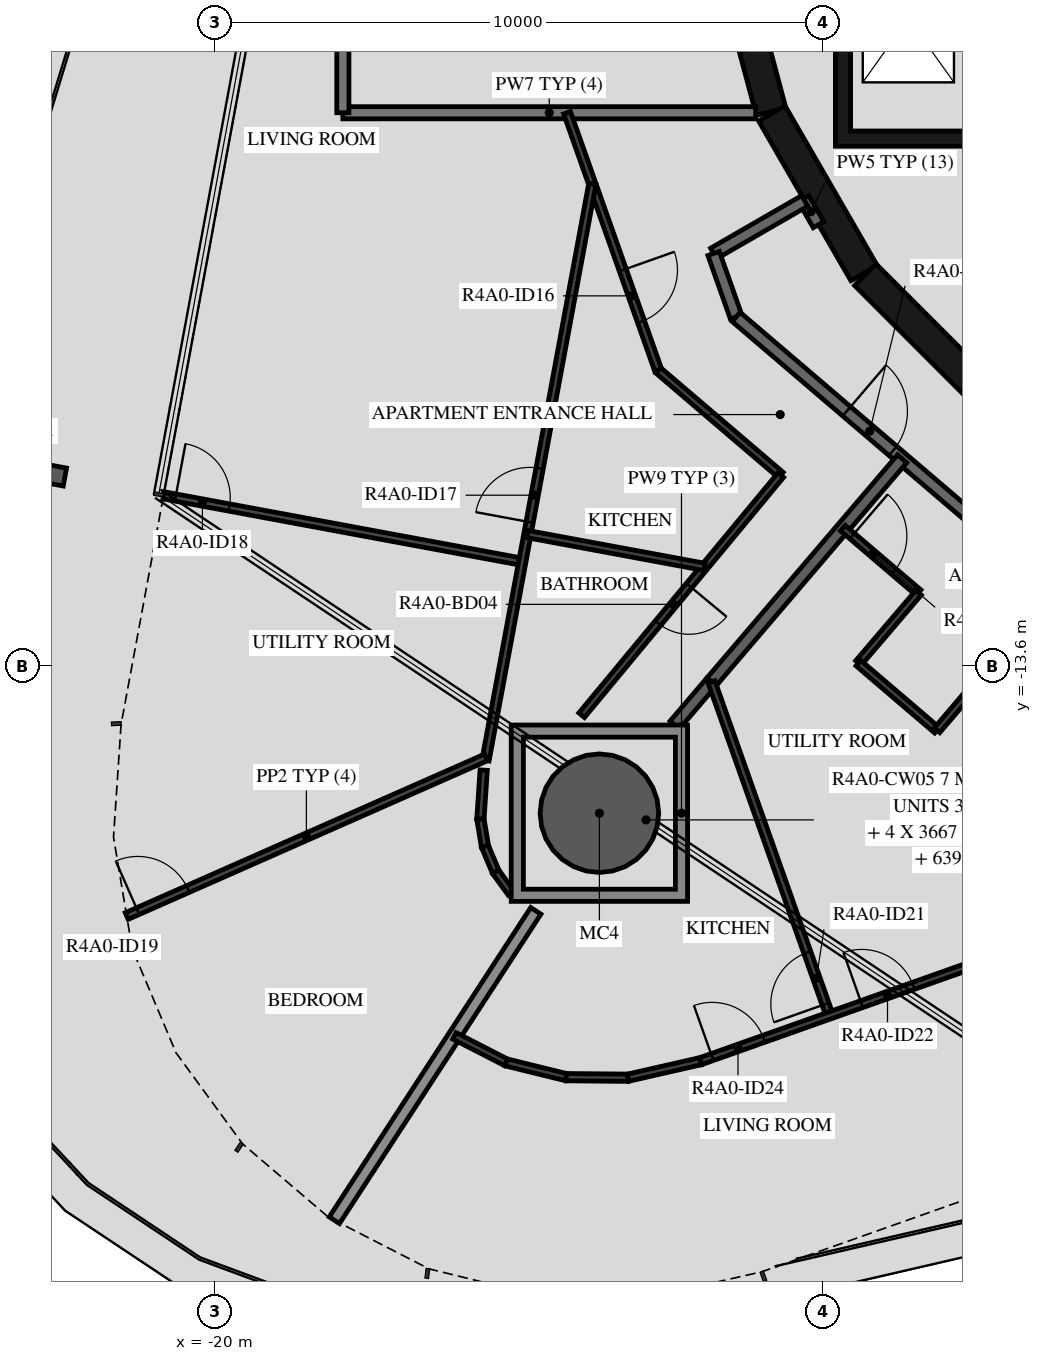
"""IFC4 building model, lengths in metres.
Left out: names, types, materials, properties, quantities, classifications, styles, units other than length and angle.
Written with IfcOpenShell. Run it as: python <this file> out.ifc"""

import sys

from ifc_helpers import new_model, si_unit, direction, frame, frame_2d, origin, origin_2d, place, context, subcontext, project, spatial, polyline, rectangle, hollow_circle, i_section, outline, extrude, element, fill, save


model = new_model("IFC4")
c1 = context("Model", 3, precision=1e-05, world=origin(), true_north=direction((0.0, 1.0)))
c2 = subcontext(c1, "Body", "Model", "MODEL_VIEW")
j1 = project(units=[si_unit("LENGTHUNIT", "METRE"), si_unit("PLANEANGLEUNIT", "RADIAN")], contexts=[c1])
p1 = place(None, origin())
s1 = spatial("IfcSite", under=j1, at=p1, CompositionType="ELEMENT")
p2 = place(p1, origin())
s2 = spatial("IfcBuilding", under=s1, at=p2, CompositionType="ELEMENT")
p3 = place(p2, frame((0.0, 0.0, 151.7)))
s3 = spatial("IfcBuildingStorey", under=s2, at=p3, CompositionType="ELEMENT", Elevation=151.7)
p4 = place(p3, frame((-13.681, -16.019, -0.45), z_axis=(0.0, 0.0, 1.0), x_axis=(1.0, 0.0, 0.0)))
e1 = element("IfcColumn", 1, at=p4, inside=s3, PredefinedType="COLUMN", context=c2, shape_type="SweptSolid", body=[
    extrude(hollow_circle(Radius=0.975, WallThickness=0.045, at=origin_2d()), origin(), (0.0, 0.0, 1.0), 3.57),
])
p5 = place(p3, frame((-22.914, -10.409, -0.45), z_axis=(0.0, 0.0, 1.0), x_axis=(0.182235967681, 0.983254825609, 0.0)))
e2 = element("IfcColumn", 2, at=p5, inside=s3, PredefinedType="COLUMN", context=c2, shape_type="SweptSolid", body=[
    extrude(i_section(OverallWidth=0.3, OverallDepth=0.9, WebThickness=0.019, FlangeThickness=0.035, FilletRadius=0.03, at=origin_2d()), origin(), (0.0, 0.0, 1.0), 3.57),
])
p6 = place(p3, frame((-11.643, -1.55, 0.0), z_axis=(0.0, 0.0, 1.0), x_axis=(0.258734743916, -0.965948410781, 0.0)))
e3 = element("IfcWall", 3, at=p6, inside=s3, PredefinedType="SHEAR", context=c2, shape_type="SweptSolid", body=[
    extrude(rectangle(XDim=3.033, YDim=0.5, at=frame_2d((1.516, 0.0))), origin(), (0.0, 0.0, 1.0), 3.12),
])
p7 = place(p6, frame((1.066, 0.0, 0.0)))
e4 = element("IfcOpeningElement", 4, at=p7, cuts=e3, PredefinedType="OPENING", context=c2, shape_type="SweptSolid", body=[
    extrude(rectangle(XDim=0.9, YDim=2.1, at=frame_2d((0.45, 1.05))), frame((0.0, 0.26, 0.0), z_axis=(0.0, -1.0, 0.0), x_axis=(1.0, 0.0, 0.0)), (0.0, 0.0, 1.0), 0.52),
])
p8 = place(p3, frame((-10.845, -4.51, 0.0), z_axis=(0.0, 0.0, 1.0), x_axis=(0.500087131594, -0.865975092491, 0.0)))
e5 = element("IfcWall", 5, at=p8, inside=s3, PredefinedType="SHEAR", context=c2, shape_type="SweptSolid", body=[
    extrude(rectangle(XDim=3.033, YDim=0.5, at=frame_2d((1.516, 0.0))), origin(), (0.0, 0.0, 1.0), 3.12),
])
p9 = place(p3, frame((-9.308, -7.164, 0.0), z_axis=(0.0, 0.0, 1.0), x_axis=(0.707106781187, -0.707106781187, 0.0)))
e6 = element("IfcWall", 6, at=p9, inside=s3, PredefinedType="SHEAR", context=c2, shape_type="SweptSolid", body=[
    extrude(rectangle(XDim=3.032, YDim=0.5, at=frame_2d((1.516, 0.0))), origin(), (0.0, 0.0, 1.0), 3.12),
])
p10 = place(p3, origin())
e7 = element("IfcWall", 7, at=p10, inside=s3, PredefinedType="SHEAR", context=c2, shape_type="SweptSolid", body=[
    extrude(outline(polyline([(9.8, -5.05), (9.8, -4.8), (9.8, -1.9), (9.55, -1.9), (9.55, -4.8), (7.65, -4.8), (7.65, -1.9), (7.4, -1.9), (7.4, -4.8), (5.5, -4.8), (5.5, -1.9), (5.25, -1.9), (5.25, -4.8), (3.35, -4.8), (3.35, -1.9), (3.1, -1.9), (3.1, -4.8), (1.2, -4.8), (1.2, -1.9), (0.95, -1.9), (0.95, -4.8), (-0.95, -4.8), (-0.95, -1.9), (-1.2, -1.9), (-1.2, -4.8), (-3.1, -4.8), (-3.1, -1.9), (-3.35, -1.9), (-3.35, -4.8), (-5.25, -4.8), (-5.25, -1.9), (-5.5, -1.9), (-5.5, -4.8), (-7.4, -4.8), (-7.4, -1.9), (-7.65, -1.9), (-7.65, -4.8), (-9.55, -4.8), (-9.55, -1.9), (-9.8, -1.9), (-9.8, -4.8), (-9.8, -5.05), (9.8, -5.05)])), origin(), (0.0, 0.0, 1.0), 3.12),
])
p11 = place(p3, frame((-10.323, -5.914, 0.0), z_axis=(0.0, 0.0, 1.0), x_axis=(0.500137201729, -0.865946175837, 0.0)))
e8 = element("IfcWall", 8, at=p11, inside=s3, PredefinedType="STANDARD", context=c2, shape_type="SweptSolid", body=[
    extrude(rectangle(XDim=0.492, YDim=0.2, at=frame_2d((0.246, 0.0))), origin(), (0.0, 0.0, 1.0), 3.12),
])
p12 = place(p3, frame((-10.303, -5.949, 0.0), z_axis=(0.0, 0.0, 1.0), x_axis=(-0.866021168401, -0.500007335828, 0.0)))
e9 = element("IfcWall", 9, at=p12, inside=s3, PredefinedType="STANDARD", context=c2, shape_type="SweptSolid", body=[
    extrude(rectangle(XDim=1.731, YDim=0.2, at=frame_2d((0.865, 0.0))), origin(), (0.0, 0.0, 1.0), 3.12),
])
p13 = place(p3, frame((-11.802, -6.814, 0.0), z_axis=(0.0, 0.0, 1.0), x_axis=(0.333904297771, -0.942606980629, 0.0)))
e10 = element("IfcWall", 10, at=p13, inside=s3, PredefinedType="STANDARD", context=c2, shape_type="SweptSolid", body=[
    extrude(rectangle(XDim=1.107, YDim=0.2, at=frame_2d((0.553, 0.0))), origin(), (0.0, 0.0, 1.0), 3.12),
])
p14 = place(p3, frame((-11.433, -7.858, 0.0), z_axis=(0.0, 0.0, 1.0), x_axis=(0.760412154545, -0.649440801937, 0.0)))
e11 = element("IfcWall", 11, at=p14, inside=s3, PredefinedType="STANDARD", context=c2, shape_type="SweptSolid", body=[
    extrude(rectangle(XDim=7.181, YDim=0.2, at=frame_2d((3.59, 0.0))), origin(), (0.0, 0.0, 1.0), 3.12),
])
p15 = place(p14, frame((2.39, 0.0, 0.0)))
e12 = element("IfcOpeningElement", 12, at=p15, cuts=e11, PredefinedType="OPENING", context=c2, shape_type="SweptSolid", body=[
    extrude(rectangle(XDim=1.0, YDim=2.1, at=frame_2d((0.5, 1.05))), frame((0.0, 0.11, 0.0), z_axis=(0.0, -1.0, 0.0), x_axis=(1.0, 0.0, 0.0)), (0.0, 0.0, 1.0), 0.22),
])
p16 = place(p3, frame((-17.9, -4.5, 0.0), z_axis=(0.0, 0.0, 1.0), x_axis=(1.0, 0.0, 0.0)))
e13 = element("IfcWall", 13, at=p16, inside=s3, PredefinedType="STANDARD", context=c2, shape_type="SweptSolid", body=[
    extrude(rectangle(XDim=6.789, YDim=0.2, at=frame_2d((3.394, 0.0))), origin(), (0.0, 0.0, 1.0), 3.12),
])
p17 = place(p3, frame((-17.9, 4.5, 0.0), z_axis=(0.0, 0.0, 1.0), x_axis=(0.0, -1.0, 0.0)))
e14 = element("IfcWall", 14, at=p17, inside=s3, PredefinedType="STANDARD", context=c2, shape_type="SweptSolid", body=[
    extrude(rectangle(XDim=9.0, YDim=0.2, at=frame_2d((4.5, 0.0))), origin(), (0.0, 0.0, 1.0), 3.12),
])
p18 = place(p3, frame((-11.838, -13.86, 0.0), z_axis=(0.0, 0.0, 1.0), x_axis=(0.64944503311, 0.760408540831, 0.0)))
e15 = element("IfcWall", 15, at=p18, inside=s3, PredefinedType="STANDARD", context=c2, shape_type="SweptSolid", body=[
    extrude(rectangle(XDim=4.827, YDim=0.2, at=frame_2d((2.414, 0.0))), origin(), (0.0, 0.0, 1.0), 3.12),
])
p19 = place(p3, frame((-12.443, -14.569, 0.0), z_axis=(0.0, 0.0, 1.0), x_axis=(0.649517408851, 0.760346720648, 0.0)))
e16 = element("IfcWall", 16, at=p19, inside=s3, PredefinedType="STANDARD", context=c2, shape_type="SweptSolid", body=[
    extrude(rectangle(XDim=0.932, YDim=0.2, at=frame_2d((0.466, 0.0))), origin(), (0.0, 0.0, 1.0), 3.12),
])
p20 = place(p3, frame((-18.04, -22.713, 0.0), z_axis=(0.0, 0.0, 1.0), x_axis=(0.545629831617, 0.83802630439, 0.0)))
e17 = element("IfcWall", 17, at=p20, inside=s3, PredefinedType="STANDARD", context=c2, shape_type="SweptSolid", body=[
    extrude(rectangle(XDim=6.072, YDim=0.2, at=frame_2d((3.036, 0.0))), origin(), (0.0, 0.0, 1.0), 2.73),
])
p21 = place(p3, frame((-14.213, -4.5, 0.0), z_axis=(0.0, 0.0, 1.0), x_axis=(0.333802904542, -0.942642891513, 0.0)))
e18 = element("IfcWall", 18, at=p21, inside=s3, PredefinedType="PARTITIONING", context=c2, shape_type="SweptSolid", body=[
    extrude(rectangle(XDim=4.495, YDim=0.12, at=frame_2d((2.248, 0.0))), origin(), (0.0, 0.0, 1.0), 3.12),
])
p22 = place(p21, frame((2.744, 0.0, 0.0)))
e19 = element("IfcOpeningElement", 19, at=p22, cuts=e18, PredefinedType="OPENING", context=c2, shape_type="SweptSolid", body=[
    extrude(rectangle(XDim=0.9, YDim=2.1, at=frame_2d((0.45, 1.05))), frame((0.0, 0.07, 0.0), z_axis=(0.0, -1.0, 0.0), x_axis=(1.0, 0.0, 0.0)), (0.0, 0.0, 1.0), 0.14),
])
p23 = place(p3, frame((-12.713, -8.737, 0.0), z_axis=(0.0, 0.0, 1.0), x_axis=(0.760400223405, -0.649454771517, 0.0)))
e20 = element("IfcWall", 20, at=p23, inside=s3, PredefinedType="PARTITIONING", context=c2, shape_type="SweptSolid", body=[
    extrude(rectangle(XDim=2.649, YDim=0.12, at=frame_2d((1.325, 0.0))), origin(), (0.0, 0.0, 1.0), 3.12),
])
p24 = place(p3, frame((-10.698, -10.458, 0.0), z_axis=(0.0, 0.0, 1.0), x_axis=(-0.63830561059, -0.769783052223, 0.0)))
e21 = element("IfcWall", 21, at=p24, inside=s3, PredefinedType="PARTITIONING", context=c2, shape_type="SweptSolid", body=[
    extrude(rectangle(XDim=5.131, YDim=0.12, at=frame_2d((2.565, 0.0))), origin(), (0.0, 0.0, 1.0), 3.12),
])
p25 = place(p24, frame((2.363, 0.0, 0.0)))
e22 = element("IfcOpeningElement", 22, at=p25, cuts=e21, PredefinedType="OPENING", context=c2, shape_type="SweptSolid", body=[
    extrude(rectangle(XDim=0.8, YDim=2.1, at=frame_2d((0.4, 1.05))), frame((0.0, 0.07, 0.0), z_axis=(0.0, -1.0, 0.0), x_axis=(1.0, 0.0, 0.0)), (0.0, 0.0, 1.0), 0.14),
])
p26 = place(p3, frame((-20.849, -10.792, 0.0), z_axis=(0.0, 0.0, 1.0), x_axis=(0.983251500113, -0.182253909494, 0.0)))
e23 = element("IfcWall", 23, at=p26, inside=s3, PredefinedType="PARTITIONING", context=c2, shape_type="SweptSolid", body=[
    extrude(rectangle(XDim=6.0, YDim=0.12, at=frame_2d((3.0, 0.0))), origin(), (0.0, 0.0, 1.0), 2.73),
])
p27 = place(p26, frame((0.2, 0.0, 0.0)))
e24 = element("IfcOpeningElement", 24, at=p27, cuts=e23, PredefinedType="OPENING", context=c2, shape_type="SweptSolid", body=[
    extrude(rectangle(XDim=0.9, YDim=2.1, at=frame_2d((0.45, 1.05))), frame((0.0, 0.07, 0.0), z_axis=(0.0, -1.0, 0.0), x_axis=(1.0, 0.0, 0.0)), (0.0, 0.0, 1.0), 0.14),
])
p28 = place(p3, frame((-15.554, -15.149, 0.0), z_axis=(0.0, 0.0, 1.0), x_axis=(0.182237116667, 0.983254612656, 0.0)))
e25 = element("IfcWall", 25, at=p28, inside=s3, PredefinedType="PARTITIONING", context=c2, shape_type="SweptSolid", body=[
    extrude(rectangle(XDim=9.638, YDim=0.12, at=frame_2d((4.819, 0.0))), origin(), (0.0, 0.0, 1.0), 3.12),
])
p29 = place(p28, frame((3.984, 0.0, 0.0)))
e26 = element("IfcOpeningElement", 26, at=p29, cuts=e25, PredefinedType="OPENING", context=c2, shape_type="SweptSolid", body=[
    extrude(rectangle(XDim=0.9, YDim=2.1, at=frame_2d((0.45, 1.05))), frame((0.0, 0.07, 0.0), z_axis=(0.0, -1.0, 0.0), x_axis=(1.0, 0.0, 0.0)), (0.0, 0.0, 1.0), 0.14),
])
p30 = place(p3, frame((-21.455, -17.71, 0.0), z_axis=(0.0, 0.0, 1.0), x_axis=(0.914829518237, 0.403840256243, 0.0)))
e27 = element("IfcWall", 27, at=p30, inside=s3, PredefinedType="PARTITIONING", context=c2, shape_type="SweptSolid", body=[
    extrude(rectangle(XDim=6.459, YDim=0.12, at=frame_2d((3.23, 0.0))), origin(), (0.0, 0.0, 1.0), 2.73),
])
p31 = place(p30, frame((0.2, 0.0, 0.0)))
e28 = element("IfcOpeningElement", 28, at=p31, cuts=e27, PredefinedType="OPENING", context=c2, shape_type="SweptSolid", body=[
    extrude(rectangle(XDim=0.9, YDim=2.1, at=frame_2d((0.45, 1.05))), frame((0.0, 0.07, 0.0), z_axis=(0.0, -1.0, 0.0), x_axis=(1.0, 0.0, 0.0)), (0.0, 0.0, 1.0), 0.14),
])
p32 = place(p3, frame((-14.865, -11.428, 0.0), z_axis=(0.0, 0.0, 1.0), x_axis=(0.983255224962, -0.182233812955, 0.0)))
e29 = element("IfcWall", 29, at=p32, inside=s3, PredefinedType="PARTITIONING", context=c2, shape_type="SweptSolid", body=[
    extrude(rectangle(XDim=2.963, YDim=0.12, at=frame_2d((1.482, 0.0))), origin(), (0.0, 0.0, 1.0), 3.12),
])
p33 = place(p3, frame((-15.584, -15.311, 0.0), z_axis=(0.0, 0.0, 1.0), x_axis=(-0.066880551605, -0.997760989324, 0.0)))
e30 = element("IfcWall", 30, at=p33, inside=s3, PredefinedType="PARTITIONING", context=c2, shape_type="SweptSolid", body=[
    extrude(rectangle(XDim=0.807, YDim=0.12, at=frame_2d((0.403, 0.0))), origin(), (0.0, 0.0, 1.0), 3.12),
])
for number, where, z_axis, x_axis in (
    (31, (-15.638, -16.115, 0.0), (0.0, 0.0, 1.0), (0.165, -0.986, 0.0)),
    (32, (-15.563, -16.564, 0.0), (0.0, 0.0, 1.0), (0.389, -0.921, 0.0)),
):
    element("IfcWall", number, at=place(p3, frame(where, z_axis=z_axis, x_axis=x_axis)), inside=s3, PredefinedType="PARTITIONING", context=c2, shape_type="SweptSolid", body=[
        extrude(rectangle(XDim=0.455, YDim=0.12, at=frame_2d((0.228, 0.0))), origin(), (0.0, 0.0, 1.0), 3.12),
    ])
p34 = place(p3, frame((-15.386, -16.983, 0.0), z_axis=(0.0, 0.0, 1.0), x_axis=(0.590016589342, -0.807391122258, 0.0)))
e33 = element("IfcWall", 33, at=p34, inside=s3, PredefinedType="PARTITIONING", context=c2, shape_type="SweptSolid", body=[
    extrude(rectangle(XDim=0.432, YDim=0.12, at=frame_2d((0.216, 0.0))), origin(), (0.0, 0.0, 1.0), 3.12),
])
p35 = place(p3, frame((-9.677, -11.33, 0.0), z_axis=(0.0, 0.0, 1.0), x_axis=(0.760372142735, -0.649487647729, 0.0)))
e34 = element("IfcWall", 34, at=p35, inside=s3, PredefinedType="PARTITIONING", context=c2, shape_type="SweptSolid", body=[
    extrude(rectangle(XDim=1.636, YDim=0.12, at=frame_2d((0.818, 0.0))), origin(), (0.0, 0.0, 1.0), 3.12),
])
p36 = place(p35, frame((0.2, 0.0, 0.0)))
e35 = element("IfcOpeningElement", 35, at=p36, cuts=e34, PredefinedType="OPENING", context=c2, shape_type="SweptSolid", body=[
    extrude(rectangle(XDim=0.9, YDim=2.1, at=frame_2d((0.45, 1.05))), frame((0.0, 0.07, 0.0), z_axis=(0.0, -1.0, 0.0), x_axis=(1.0, 0.0, 0.0)), (0.0, 0.0, 1.0), 0.14),
])
p37 = place(p3, frame((-8.433, -12.393, 0.0), z_axis=(0.0, 0.0, 1.0), x_axis=(-0.649443355674, -0.760409973482, 0.0)))
e36 = element("IfcWall", 36, at=p37, inside=s3, PredefinedType="PARTITIONING", context=c2, shape_type="SweptSolid", body=[
    extrude(rectangle(XDim=1.522, YDim=0.12, at=frame_2d((0.761, 0.0))), origin(), (0.0, 0.0, 1.0), 3.12),
])
p38 = place(p3, frame((-9.422, -13.55, 0.0), z_axis=(0.0, 0.0, 1.0), x_axis=(0.760431300628, -0.649418383652, 0.0)))
e37 = element("IfcWall", 37, at=p38, inside=s3, PredefinedType="PARTITIONING", context=c2, shape_type="SweptSolid", body=[
    extrude(rectangle(XDim=1.7, YDim=0.12, at=frame_2d((0.85, 0.0))), origin(), (0.0, 0.0, 1.0), 3.12),
])
p39 = place(p3, frame((-8.129, -14.654, 0.0), z_axis=(0.0, 0.0, 1.0), x_axis=(0.649443355674, 0.760409973482, 0.0)))
e38 = element("IfcWall", 38, at=p39, inside=s3, PredefinedType="PARTITIONING", context=c2, shape_type="SweptSolid", body=[
    extrude(rectangle(XDim=1.522, YDim=0.12, at=frame_2d((0.761, 0.0))), origin(), (0.0, 0.0, 1.0), 3.12),
])
p40 = place(p3, frame((-9.895, -19.346, 0.0), z_axis=(0.0, 0.0, 1.0), x_axis=(-0.333781129158, 0.942650602195, 0.0)))
e39 = element("IfcWall", 39, at=p40, inside=s3, PredefinedType="PARTITIONING", context=c2, shape_type="SweptSolid", body=[
    extrude(rectangle(XDim=5.819, YDim=0.12, at=frame_2d((2.91, 0.0))), origin(), (0.0, 0.0, 1.0), 3.12),
])
p41 = place(p40, frame((0.2, 0.0, 0.0)))
e40 = element("IfcOpeningElement", 40, at=p41, cuts=e39, PredefinedType="OPENING", context=c2, shape_type="SweptSolid", body=[
    extrude(rectangle(XDim=0.9, YDim=2.1, at=frame_2d((0.45, 1.05))), frame((0.0, 0.07, 0.0), z_axis=(0.0, -1.0, 0.0), x_axis=(1.0, 0.0, 0.0)), (0.0, 0.0, 1.0), 0.14),
])
p42 = place(p3, frame((-16.065, -19.68, 0.0), z_axis=(0.0, 0.0, 1.0), x_axis=(0.889684645268, -0.456575549033, 0.0)))
e41 = element("IfcWall", 41, at=p42, inside=s3, PredefinedType="PARTITIONING", context=c2, shape_type="SweptSolid", body=[
    extrude(rectangle(XDim=0.957, YDim=0.12, at=frame_2d((0.479, 0.0))), origin(), (0.0, 0.0, 1.0), 3.12),
])
p43 = place(p3, frame((-15.214, -20.117, 0.0), z_axis=(0.0, 0.0, 1.0), x_axis=(0.970998575146, -0.239085271534, 0.0)))
e42 = element("IfcWall", 42, at=p43, inside=s3, PredefinedType="PARTITIONING", context=c2, shape_type="SweptSolid", body=[
    extrude(rectangle(XDim=1.016, YDim=0.12, at=frame_2d((0.508, 0.0))), origin(), (0.0, 0.0, 1.0), 3.12),
])
p44 = place(p3, frame((-14.227, -20.36, 0.0), z_axis=(0.0, 0.0, 1.0), x_axis=(0.999960467683, -0.008891741722, 0.0)))
e43 = element("IfcWall", 43, at=p44, inside=s3, PredefinedType="PARTITIONING", context=c2, shape_type="SweptSolid", body=[
    extrude(rectangle(XDim=1.016, YDim=0.12, at=frame_2d((0.508, 0.0))), origin(), (0.0, 0.0, 1.0), 3.12),
])
p45 = place(p3, frame((-13.211, -20.369, 0.0), z_axis=(0.0, 0.0, 1.0), x_axis=(0.974997834831, 0.222214360642, 0.0)))
e44 = element("IfcWall", 44, at=p45, inside=s3, PredefinedType="PARTITIONING", context=c2, shape_type="SweptSolid", body=[
    extrude(rectangle(XDim=1.227, YDim=0.12, at=frame_2d((0.614, 0.0))), origin(), (0.0, 0.0, 1.0), 3.12),
])
p46 = place(p3, frame((-12.015, -20.096, 0.0), z_axis=(0.0, 0.0, 1.0), x_axis=(0.942638718556, 0.333814688531, 0.0)))
e45 = element("IfcWall", 45, at=p46, inside=s3, PredefinedType="PARTITIONING", context=c2, shape_type="SweptSolid", body=[
    extrude(rectangle(XDim=8.216, YDim=0.12, at=frame_2d((4.108, 0.0))), origin(), (0.0, 0.0, 1.0), 3.12),
])
p47 = place(p46, frame((2.809, 0.0, 0.0)))
e46 = element("IfcOpeningElement", 46, at=p47, cuts=e45, PredefinedType="OPENING", context=c2, shape_type="SweptSolid", body=[
    extrude(rectangle(XDim=0.9, YDim=2.1, at=frame_2d((0.45, 1.05))), frame((0.0, 0.07, 0.0), z_axis=(0.0, -1.0, 0.0), x_axis=(1.0, 0.0, 0.0)), (0.0, 0.0, 1.0), 0.14),
])
p48 = place(p46, frame((0.2, 0.0, 0.0)))
e47 = element("IfcOpeningElement", 47, at=p48, cuts=e45, PredefinedType="OPENING", context=c2, shape_type="SweptSolid", body=[
    extrude(rectangle(XDim=0.9, YDim=2.1, at=frame_2d((0.45, 1.05))), frame((0.0, 0.07, 0.0), z_axis=(0.0, -1.0, 0.0), x_axis=(1.0, 0.0, 0.0)), (0.0, 0.0, 1.0), 0.14),
])
p49 = place(p3, origin())
e48 = element("IfcWall", 48, at=p49, inside=s3, PredefinedType="STANDARD", context=c2, shape_type="SweptSolid", body=[
    extrude(outline(polyline([(-12.231, -14.569), (-12.231, -17.469), (-15.131, -17.469), (-15.131, -14.569), (-12.231, -14.569)]), holes=[polyline([(-14.931, -17.269), (-12.431, -17.269), (-12.431, -14.769), (-14.931, -14.769), (-14.931, -17.269)])]), origin(), (0.0, 0.0, 1.0), 3.12),
])
p50 = place(p15, origin())
e49 = element("IfcDoor", 49, at=p50, inside=s3, OperationType="SINGLE_SWING_RIGHT", PredefinedType="DOOR", context=c2, shape_type="SweptSolid", body=[
    extrude(rectangle(XDim=1.0, YDim=2.1, at=frame_2d((0.5, 1.05))), frame((0.0, 0.025, 0.0), z_axis=(0.0, -1.0, 0.0), x_axis=(1.0, 0.0, 0.0)), (0.0, 0.0, 1.0), 0.05),
])
fill(e12, e49)
p51 = place(p22, origin())
e50 = element("IfcDoor", 50, at=p51, inside=s3, OperationType="SINGLE_SWING_RIGHT", PredefinedType="DOOR", context=c2, shape_type="SweptSolid", body=[
    extrude(rectangle(XDim=0.9, YDim=2.1, at=frame_2d((0.45, 1.05))), frame((0.0, 0.025, 0.0), z_axis=(0.0, -1.0, 0.0), x_axis=(1.0, 0.0, 0.0)), (0.0, 0.0, 1.0), 0.05),
])
fill(e19, e50)
p52 = place(p25, origin())
e51 = element("IfcDoor", 51, at=p52, inside=s3, OperationType="SINGLE_SWING_RIGHT", PredefinedType="DOOR", context=c2, shape_type="SweptSolid", body=[
    extrude(rectangle(XDim=0.8, YDim=2.1, at=frame_2d((0.4, 1.05))), frame((0.0, 0.025, 0.0), z_axis=(0.0, -1.0, 0.0), x_axis=(1.0, 0.0, 0.0)), (0.0, 0.0, 1.0), 0.05),
])
fill(e22, e51)
p53 = place(p29, origin())
e52 = element("IfcDoor", 52, at=p53, inside=s3, OperationType="SINGLE_SWING_RIGHT", PredefinedType="DOOR", context=c2, shape_type="SweptSolid", body=[
    extrude(rectangle(XDim=0.9, YDim=2.1, at=frame_2d((0.45, 1.05))), frame((0.0, 0.025, 0.0), z_axis=(0.0, -1.0, 0.0), x_axis=(1.0, 0.0, 0.0)), (0.0, 0.0, 1.0), 0.05),
])
fill(e26, e52)
p54 = place(p27, origin())
e53 = element("IfcDoor", 53, at=p54, inside=s3, OperationType="SINGLE_SWING_RIGHT", PredefinedType="DOOR", context=c2, shape_type="SweptSolid", body=[
    extrude(rectangle(XDim=0.9, YDim=2.1, at=frame_2d((0.45, 1.05))), frame((0.0, 0.025, 0.0), z_axis=(0.0, -1.0, 0.0), x_axis=(1.0, 0.0, 0.0)), (0.0, 0.0, 1.0), 0.05),
])
fill(e24, e53)
p55 = place(p31, origin())
e54 = element("IfcDoor", 54, at=p55, inside=s3, OperationType="SINGLE_SWING_RIGHT", PredefinedType="DOOR", context=c2, shape_type="SweptSolid", body=[
    extrude(rectangle(XDim=0.9, YDim=2.1, at=frame_2d((0.45, 1.05))), frame((0.0, 0.025, 0.0), z_axis=(0.0, -1.0, 0.0), x_axis=(1.0, 0.0, 0.0)), (0.0, 0.0, 1.0), 0.05),
])
fill(e28, e54)
p56 = place(p36, origin())
e55 = element("IfcDoor", 55, at=p56, inside=s3, OperationType="SINGLE_SWING_LEFT", PredefinedType="DOOR", context=c2, shape_type="SweptSolid", body=[
    extrude(rectangle(XDim=0.9, YDim=2.1, at=frame_2d((0.45, 1.05))), frame((0.0, 0.025, 0.0), z_axis=(0.0, -1.0, 0.0), x_axis=(1.0, 0.0, 0.0)), (0.0, 0.0, 1.0), 0.05),
])
fill(e35, e55)
p57 = place(p41, origin())
e56 = element("IfcDoor", 56, at=p57, inside=s3, OperationType="SINGLE_SWING_LEFT", PredefinedType="DOOR", context=c2, shape_type="SweptSolid", body=[
    extrude(rectangle(XDim=0.9, YDim=2.1, at=frame_2d((0.45, 1.05))), frame((0.0, 0.025, 0.0), z_axis=(0.0, -1.0, 0.0), x_axis=(1.0, 0.0, 0.0)), (0.0, 0.0, 1.0), 0.05),
])
fill(e40, e56)
p58 = place(p47, origin())
e57 = element("IfcDoor", 57, at=p58, inside=s3, OperationType="SINGLE_SWING_LEFT", PredefinedType="DOOR", context=c2, shape_type="SweptSolid", body=[
    extrude(rectangle(XDim=0.9, YDim=2.1, at=frame_2d((0.45, 1.05))), frame((0.0, 0.025, 0.0), z_axis=(0.0, -1.0, 0.0), x_axis=(1.0, 0.0, 0.0)), (0.0, 0.0, 1.0), 0.05),
])
fill(e46, e57)
p59 = place(p48, origin())
e58 = element("IfcDoor", 58, at=p59, inside=s3, OperationType="SINGLE_SWING_LEFT", PredefinedType="DOOR", context=c2, shape_type="SweptSolid", body=[
    extrude(rectangle(XDim=0.9, YDim=2.1, at=frame_2d((0.45, 1.05))), frame((0.0, 0.025, 0.0), z_axis=(0.0, -1.0, 0.0), x_axis=(1.0, 0.0, 0.0)), (0.0, 0.0, 1.0), 0.05),
])
fill(e47, e58)
save(model, sys.argv[1])
